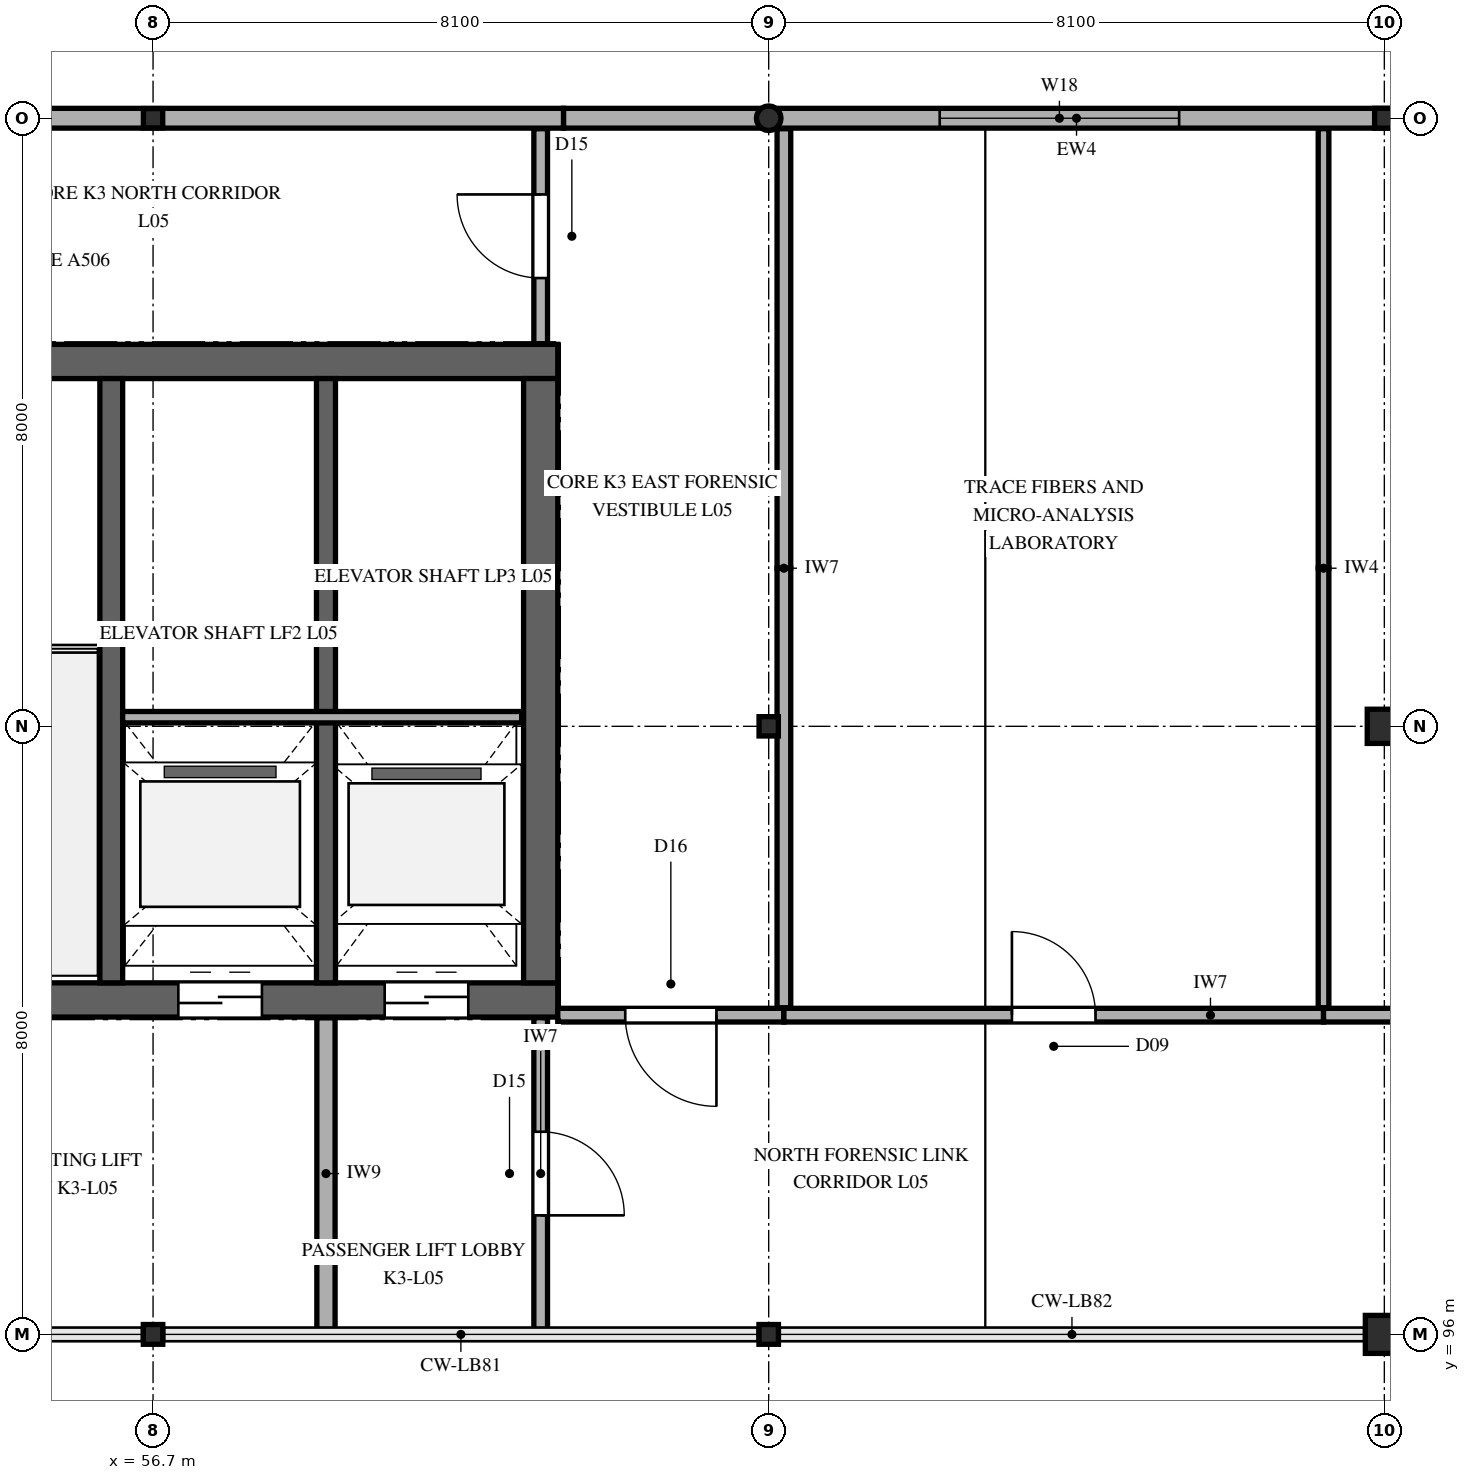
"""IFC4 building model, lengths in metres.
Left out: names, types, materials, properties, quantities, classifications, styles, units other than length and angle.
Written with IfcOpenShell. Run it as: python <this file> out.ifc"""

import sys

from ifc_helpers import new_model, si_unit, direction, frame, frame_2d, origin, origin_2d, place, context, subcontext, project, spatial, rectangle, hollow_rectangle, hollow_circle, i_section, extrude, element, fill, save


model = new_model("IFC4")
c1 = context("Model", 3, precision=1e-05, world=origin(), true_north=direction((0.0, 1.0)))
c2 = subcontext(c1, "Body", "Model", "MODEL_VIEW")
j1 = project(units=[si_unit("LENGTHUNIT", "METRE"), si_unit("PLANEANGLEUNIT", "RADIAN")], contexts=[c1])
p1 = place(None, origin())
s1 = spatial("IfcSite", under=j1, at=p1, CompositionType="ELEMENT")
p2 = place(p1, origin())
s2 = spatial("IfcBuilding", under=s1, at=p2, CompositionType="ELEMENT")
p3 = place(p2, frame((0.0, 0.0, 24.9)))
s3 = spatial("IfcBuildingStorey", under=s2, at=p3, CompositionType="ELEMENT", Elevation=24.9)
p4 = place(p3, frame((46.775, 100.4, 0.0), z_axis=(0.0, 0.0, 1.0), x_axis=(1.0, 0.0, 0.0)))
e1 = element("IfcWall", 1, at=p4, inside=s3, PredefinedType="SHEAR", context=c2, shape_type="SweptSolid", body=[
    extrude(rectangle(XDim=15.25, YDim=0.45, at=frame_2d((7.625, 0.0))), origin(), (0.0, 0.0, 1.0), 4.2),
])
p5 = place(p4, frame((0.975, 0.0, 0.0)))
e2 = element("IfcOpeningElement", 2, at=p5, cuts=e1, PredefinedType="OPENING", context=c2, shape_type="SweptSolid", body=[
    extrude(rectangle(XDim=1.15, YDim=2.25, at=frame_2d((0.575, 1.125))), frame((0.0, 0.235, 0.0), z_axis=(0.0, -1.0, 0.0), x_axis=(1.0, 0.0, 0.0)), (0.0, 0.0, 1.0), 0.47),
])
p6 = place(p4, frame((10.258, 0.0, 0.0)))
e3 = element("IfcOpeningElement", 3, at=p6, cuts=e1, PredefinedType="OPENING", context=c2, shape_type="SweptSolid", body=[
    extrude(rectangle(XDim=1.1, YDim=2.2, at=frame_2d((0.55, 1.1))), frame((0.0, 0.235, 0.0), z_axis=(0.0, -1.0, 0.0), x_axis=(1.0, 0.0, 0.0)), (0.0, 0.0, 1.0), 0.47),
])
p7 = place(p4, frame((12.972, 0.0, 0.0)))
e4 = element("IfcOpeningElement", 4, at=p7, cuts=e1, PredefinedType="OPENING", context=c2, shape_type="SweptSolid", body=[
    extrude(rectangle(XDim=1.1, YDim=2.2, at=frame_2d((0.55, 1.1))), frame((0.0, 0.235, 0.0), z_axis=(0.0, -1.0, 0.0), x_axis=(1.0, 0.0, 0.0)), (0.0, 0.0, 1.0), 0.47),
])
p8 = place(p3, frame((46.775, 108.8, 0.0), z_axis=(0.0, 0.0, 1.0), x_axis=(1.0, 0.0, 0.0)))
e5 = element("IfcWall", 5, at=p8, inside=s3, PredefinedType="SHEAR", context=c2, shape_type="SweptSolid", body=[
    extrude(rectangle(XDim=15.25, YDim=0.45, at=frame_2d((7.625, 0.0))), origin(), (0.0, 0.0, 1.0), 4.2),
])
p9 = place(p3, frame((61.8, 100.625, 0.0), z_axis=(0.0, 0.0, 1.0), x_axis=(0.0, 1.0, 0.0)))
e6 = element("IfcWall", 6, at=p9, inside=s3, PredefinedType="SHEAR", context=c2, shape_type="SweptSolid", body=[
    extrude(rectangle(XDim=7.95, YDim=0.45, at=frame_2d((3.975, 0.0))), origin(), (0.0, 0.0, 1.0), 4.2),
])
p10 = place(p3, frame((56.15, 100.625, 0.0), z_axis=(0.0, 0.0, 1.0), x_axis=(0.0, 1.0, 0.0)))
e7 = element("IfcWall", 7, at=p10, inside=s3, PredefinedType="SHEAR", context=c2, shape_type="SweptSolid", body=[
    extrude(rectangle(XDim=7.95, YDim=0.3, at=frame_2d((3.975, 0.0))), origin(), (0.0, 0.0, 1.0), 4.2),
])
p11 = place(p3, frame((58.975, 100.625, 0.0), z_axis=(0.0, 0.0, 1.0), x_axis=(0.0, 1.0, 0.0)))
e8 = element("IfcWall", 8, at=p11, inside=s3, PredefinedType="SHEAR", context=c2, shape_type="SweptSolid", body=[
    extrude(rectangle(XDim=7.95, YDim=0.25, at=frame_2d((3.975, 0.0))), origin(), (0.0, 0.0, 1.0), 4.2),
])
p12 = place(p3, frame((56.7, 96.0, 0.0), z_axis=(0.0, 0.0, 1.0), x_axis=(1.0, 0.0, 0.0)))
e9 = element("IfcColumn", 9, at=p12, inside=s3, PredefinedType="COLUMN", context=c2, shape_type="SweptSolid", body=[
    extrude(i_section(OverallWidth=0.256, OverallDepth=0.26, WebThickness=0.011, FlangeThickness=0.017, FilletRadius=0.013, at=origin_2d()), origin(), (0.0, 0.0, 1.0), 4.2),
])
p13 = place(p3, frame((56.7, 112.0, 0.0), z_axis=(0.0, 0.0, 1.0), x_axis=(1.0, 0.0, 0.0)))
e10 = element("IfcColumn", 10, at=p13, inside=s3, PredefinedType="COLUMN", context=c2, shape_type="SweptSolid", body=[
    extrude(hollow_rectangle(XDim=0.254, YDim=0.254, WallThickness=0.013, InnerFilletRadius=0.013, OuterFilletRadius=0.025, at=origin_2d()), origin(), (0.0, 0.0, 1.0), 4.2),
])
p14 = place(p3, frame((64.8, 96.0, 0.0), z_axis=(0.0, 0.0, 1.0), x_axis=(1.0, 0.0, 0.0)))
e11 = element("IfcColumn", 11, at=p14, inside=s3, PredefinedType="COLUMN", context=c2, shape_type="SweptSolid", body=[
    extrude(i_section(OverallWidth=0.256, OverallDepth=0.26, WebThickness=0.011, FlangeThickness=0.017, FilletRadius=0.013, at=origin_2d()), origin(), (0.0, 0.0, 1.0), 4.2),
])
p15 = place(p3, frame((64.8, 104.0, 0.0), z_axis=(0.0, 0.0, 1.0), x_axis=(1.0, 0.0, 0.0)))
e12 = element("IfcColumn", 12, at=p15, inside=s3, PredefinedType="COLUMN", context=c2, shape_type="SweptSolid", body=[
    extrude(hollow_rectangle(XDim=0.254, YDim=0.254, WallThickness=0.013, InnerFilletRadius=0.013, OuterFilletRadius=0.025, at=origin_2d()), origin(), (0.0, 0.0, 1.0), 4.2),
])
p16 = place(p3, frame((64.8, 112.0, 0.0), z_axis=(0.0, 0.0, 1.0), x_axis=(1.0, 0.0, 0.0)))
e13 = element("IfcColumn", 13, at=p16, inside=s3, PredefinedType="COLUMN", context=c2, shape_type="SweptSolid", body=[
    extrude(hollow_circle(Radius=0.162, WallThickness=0.013, at=origin_2d()), origin(), (0.0, 0.0, 1.0), 4.2),
])
p17 = place(p3, frame((72.9, 96.0, 0.0), z_axis=(0.0, 0.0, 1.0), x_axis=(1.0, 0.0, 0.0)))
e14 = element("IfcColumn", 14, at=p17, inside=s3, PredefinedType="COLUMN", context=c2, shape_type="SweptSolid", body=[
    extrude(rectangle(XDim=0.5, YDim=0.5, at=origin_2d()), origin(), (0.0, 0.0, 1.0), 4.2),
])
p18 = place(p3, frame((72.9, 104.0, 0.0), z_axis=(0.0, 0.0, 1.0), x_axis=(1.0, 0.0, 0.0)))
e15 = element("IfcColumn", 15, at=p18, inside=s3, PredefinedType="COLUMN", context=c2, shape_type="SweptSolid", body=[
    extrude(rectangle(XDim=0.45, YDim=0.45, at=origin_2d()), origin(), (0.0, 0.0, 1.0), 4.2),
])
p19 = place(p3, frame((72.9, 112.0, 0.0), z_axis=(0.0, 0.0, 1.0), x_axis=(1.0, 0.0, 0.0)))
e16 = element("IfcColumn", 16, at=p19, inside=s3, PredefinedType="COLUMN", context=c2, shape_type="SweptSolid", body=[
    extrude(i_section(OverallWidth=0.256, OverallDepth=0.26, WebThickness=0.011, FlangeThickness=0.017, FilletRadius=0.013, at=origin_2d()), origin(), (0.0, 0.0, 1.0), 4.2),
])
p20 = place(p3, frame((75.6, 112.0, 0.0), z_axis=(0.0, 0.0, 1.0), x_axis=(-1.0, 0.0, 0.0)))
e17 = element("IfcWall", 17, at=p20, inside=s3, PredefinedType="SOLIDWALL", context=c2, shape_type="SweptSolid", body=[
    extrude(rectangle(XDim=13.5, YDim=0.26, at=frame_2d((6.75, 0.0))), origin(), (0.0, 0.0, 1.0), 3.302),
])
p21 = place(p20, frame((5.4, 0.0, 0.95)))
e18 = element("IfcOpeningElement", 18, at=p21, cuts=e17, PredefinedType="OPENING", context=c2, shape_type="SweptSolid", body=[
    extrude(rectangle(XDim=3.15, YDim=1.6, at=frame_2d((1.575, 0.8))), frame((0.0, 0.14, 0.0), z_axis=(0.0, -1.0, 0.0), x_axis=(1.0, 0.0, 0.0)), (0.0, 0.0, 1.0), 0.28),
])
p22 = place(p3, frame((62.1, 112.0, 0.0), z_axis=(0.0, 0.0, 1.0), x_axis=(-1.0, 0.0, 0.0)))
e19 = element("IfcWall", 19, at=p22, inside=s3, PredefinedType="SOLIDWALL", context=c2, shape_type="SweptSolid", body=[
    extrude(rectangle(XDim=13.5, YDim=0.26, at=frame_2d((6.75, 0.0))), origin(), (0.0, 0.0, 1.0), 3.402),
])
p23 = place(p22, frame((7.2, 0.0, 0.95)))
e20 = element("IfcOpeningElement", 20, at=p23, cuts=e19, PredefinedType="OPENING", context=c2, shape_type="SweptSolid", body=[
    extrude(rectangle(XDim=3.6, YDim=1.8, at=frame_2d((1.8, 0.9))), frame((0.0, 0.14, 0.0), z_axis=(0.0, -1.0, 0.0), x_axis=(1.0, 0.0, 0.0)), (0.0, 0.0, 1.0), 0.28),
])
p24 = place(p3, frame((56.3, 104.12, 0.0), z_axis=(0.0, 0.0, 1.0), x_axis=(1.0, 0.0, 0.0)))
e21 = element("IfcWall", 21, at=p24, inside=s3, PredefinedType="PARTITIONING", context=c2, shape_type="SweptSolid", body=[
    extrude(rectangle(XDim=5.25, YDim=0.15, at=frame_2d((2.625, 0.0))), origin(), (0.0, 0.0, 1.0), 3.96),
])
p25 = place(p3, frame((62.025, 100.2, 0.0), z_axis=(0.0, 0.0, 1.0), x_axis=(1.0, 0.0, 0.0)))
e22 = element("IfcWall", 22, at=p25, inside=s3, PredefinedType="PARTITIONING", context=c2, shape_type="SweptSolid", body=[
    extrude(rectangle(XDim=2.975, YDim=0.18, at=frame_2d((1.488, 0.0))), origin(), (0.0, 0.0, 1.0), 3.96),
])
p26 = place(p25, frame((0.887, 0.0, 0.0)))
e23 = element("IfcOpeningElement", 23, at=p26, cuts=e22, PredefinedType="OPENING", context=c2, shape_type="SweptSolid", body=[
    extrude(rectangle(XDim=1.2, YDim=2.2, at=frame_2d((0.6, 1.1))), frame((0.0, 0.1, 0.0), z_axis=(0.0, -1.0, 0.0), x_axis=(1.0, 0.0, 0.0)), (0.0, 0.0, 1.0), 0.2),
])
p27 = place(p3, frame((65.0, 100.2, 0.0), z_axis=(0.0, 0.0, 1.0), x_axis=(1.0, 0.0, 0.0)))
e24 = element("IfcWall", 24, at=p27, inside=s3, PredefinedType="PARTITIONING", context=c2, shape_type="SweptSolid", body=[
    extrude(rectangle(XDim=7.1, YDim=0.18, at=frame_2d((3.55, 0.0))), origin(), (0.0, 0.0, 1.0), 3.96),
])
p28 = place(p27, frame((3.0, 0.0, 0.0)))
e25 = element("IfcOpeningElement", 25, at=p28, cuts=e24, PredefinedType="OPENING", context=c2, shape_type="SweptSolid", body=[
    extrude(rectangle(XDim=1.1, YDim=2.3, at=frame_2d((0.55, 1.15))), frame((0.0, 0.1, 0.0), z_axis=(0.0, -1.0, 0.0), x_axis=(1.0, 0.0, 0.0)), (0.0, 0.0, 1.0), 0.2),
])
p29 = place(p3, frame((72.1, 100.2, 0.0), z_axis=(0.0, 0.0, 1.0), x_axis=(1.0, 0.0, 0.0)))
e26 = element("IfcWall", 26, at=p29, inside=s3, PredefinedType="PARTITIONING", context=c2, shape_type="SweptSolid", body=[
    extrude(rectangle(XDim=7.1, YDim=0.18, at=frame_2d((3.55, 0.0))), origin(), (0.0, 0.0, 1.0), 3.96),
])
p30 = place(p29, frame((3.0, 0.0, 0.0)))
e27 = element("IfcOpeningElement", 27, at=p30, cuts=e26, PredefinedType="OPENING", context=c2, shape_type="SweptSolid", body=[
    extrude(rectangle(XDim=1.1, YDim=2.3, at=frame_2d((0.55, 1.15))), frame((0.0, 0.1, 0.0), z_axis=(0.0, -1.0, 0.0), x_axis=(1.0, 0.0, 0.0)), (0.0, 0.0, 1.0), 0.2),
])
p31 = place(p3, frame((58.975, 96.065, 0.0), z_axis=(0.0, 0.0, 1.0), x_axis=(0.0, 1.0, 0.0)))
e28 = element("IfcWall", 28, at=p31, inside=s3, PredefinedType="PARTITIONING", context=c2, shape_type="SweptSolid", body=[
    extrude(rectangle(XDim=4.102, YDim=0.24, at=frame_2d((2.051, 0.0))), origin(), (0.0, 0.0, 1.0), 3.96),
])
p32 = place(p3, frame((61.8, 96.065, 0.0), z_axis=(0.0, 0.0, 1.0), x_axis=(0.0, 1.0, 0.0)))
e29 = element("IfcWall", 29, at=p32, inside=s3, PredefinedType="PARTITIONING", context=c2, shape_type="SweptSolid", body=[
    extrude(rectangle(XDim=4.102, YDim=0.18, at=frame_2d((2.051, 0.0))), origin(), (0.0, 0.0, 1.0), 3.96),
])
p33 = place(p32, frame((1.501, 0.0, 0.0)))
e30 = element("IfcOpeningElement", 30, at=p33, cuts=e29, PredefinedType="OPENING", context=c2, shape_type="SweptSolid", body=[
    extrude(rectangle(XDim=1.1, YDim=2.2, at=frame_2d((0.55, 1.1))), frame((0.0, 0.1, 0.0), z_axis=(0.0, -1.0, 0.0), x_axis=(1.0, 0.0, 0.0)), (0.0, 0.0, 1.0), 0.2),
])
p34 = place(p3, frame((61.8, 109.033, 0.0), z_axis=(0.0, 0.0, 1.0), x_axis=(0.0, 1.0, 0.0)))
e31 = element("IfcWall", 31, at=p34, inside=s3, PredefinedType="PARTITIONING", context=c2, shape_type="SweptSolid", body=[
    extrude(rectangle(XDim=2.829, YDim=0.18, at=frame_2d((1.415, 0.0))), origin(), (0.0, 0.0, 1.0), 3.96),
])
p35 = place(p34, frame((0.865, 0.0, 0.0)))
e32 = element("IfcOpeningElement", 32, at=p35, cuts=e31, PredefinedType="OPENING", context=c2, shape_type="SweptSolid", body=[
    extrude(rectangle(XDim=1.1, YDim=2.2, at=frame_2d((0.55, 1.1))), frame((0.0, 0.1, 0.0), z_axis=(0.0, -1.0, 0.0), x_axis=(1.0, 0.0, 0.0)), (0.0, 0.0, 1.0), 0.2),
])
for number, where, z_axis, x_axis in (
    (33, (65.0, 100.298, 0.0), (0.0, 0.0, 1.0), (0.0, 1.0, 0.0)),
    (34, (65.0, 106.08, 0.0), (0.0, 0.0, 1.0), (0.0, 1.0, 0.0)),
):
    element("IfcWall", number, at=place(p3, frame(where, z_axis=z_axis, x_axis=x_axis)), inside=s3, PredefinedType="PARTITIONING", context=c2, shape_type="SweptSolid", body=[
        extrude(rectangle(XDim=5.782, YDim=0.18, at=frame_2d((2.891, 0.0))), origin(), (0.0, 0.0, 1.0), 3.452),
    ])
for number, where, z_axis, x_axis in (
    (35, (72.1, 100.298, 0.0), (0.0, 0.0, 1.0), (0.0, 1.0, 0.0)),
    (36, (72.1, 106.08, 0.0), (0.0, 0.0, 1.0), (0.0, 1.0, 0.0)),
):
    element("IfcWall", number, at=place(p3, frame(where, z_axis=z_axis, x_axis=x_axis)), inside=s3, PredefinedType="PARTITIONING", context=c2, shape_type="SweptSolid", body=[
        extrude(rectangle(XDim=5.782, YDim=0.14, at=frame_2d((2.891, 0.0))), origin(), (0.0, 0.0, 1.0), 3.96),
    ])
p36 = place(p21, origin())
e37 = element("IfcWindow", 37, at=p36, inside=s3, PartitioningType="TRIPLE_PANEL_VERTICAL", PredefinedType="WINDOW", context=c2, shape_type="SweptSolid", body=[
    extrude(rectangle(XDim=3.15, YDim=1.6, at=frame_2d((1.575, 0.8))), frame((0.0, 0.03, 0.0), z_axis=(0.0, -1.0, 0.0), x_axis=(1.0, 0.0, 0.0)), (0.0, 0.0, 1.0), 0.06),
])
fill(e18, e37)
p37 = place(p6, frame((1.1, 0.0, 0.0), z_axis=(0.0, 0.0, 1.0), x_axis=(-1.0, 0.0, 0.0)))
e38 = element("IfcDoor", 38, at=p37, inside=s3, OperationType="DOUBLE_DOOR_SLIDING", PredefinedType="DOOR", context=c2, shape_type="SweptSolid", body=[
    extrude(rectangle(XDim=1.1, YDim=2.2, at=frame_2d((0.55, 1.1))), frame((0.0, 0.025, 0.0), z_axis=(0.0, -1.0, 0.0), x_axis=(1.0, 0.0, 0.0)), (0.0, 0.0, 1.0), 0.05),
])
fill(e3, e38)
p38 = place(p7, frame((1.1, 0.0, 0.0), z_axis=(0.0, 0.0, 1.0), x_axis=(-1.0, 0.0, 0.0)))
e39 = element("IfcDoor", 39, at=p38, inside=s3, OperationType="DOUBLE_DOOR_SLIDING", PredefinedType="DOOR", context=c2, shape_type="SweptSolid", body=[
    extrude(rectangle(XDim=1.1, YDim=2.2, at=frame_2d((0.55, 1.1))), frame((0.0, 0.025, 0.0), z_axis=(0.0, -1.0, 0.0), x_axis=(1.0, 0.0, 0.0)), (0.0, 0.0, 1.0), 0.05),
])
fill(e4, e39)
p39 = place(p26, frame((1.2, 0.0, 0.0), z_axis=(0.0, 0.0, 1.0), x_axis=(-1.0, 0.0, 0.0)))
e40 = element("IfcDoor", 40, at=p39, inside=s3, OperationType="SINGLE_SWING_RIGHT", PredefinedType="DOOR", context=c2, shape_type="SweptSolid", body=[
    extrude(rectangle(XDim=1.2, YDim=2.2, at=frame_2d((0.6, 1.1))), frame((0.0, 0.025, 0.0), z_axis=(0.0, -1.0, 0.0), x_axis=(1.0, 0.0, 0.0)), (0.0, 0.0, 1.0), 0.05),
])
fill(e23, e40)
p40 = place(p28, origin())
e41 = element("IfcDoor", 41, at=p40, inside=s3, OperationType="SINGLE_SWING_LEFT", PredefinedType="DOOR", context=c2, shape_type="SweptSolid", body=[
    extrude(rectangle(XDim=1.1, YDim=2.3, at=frame_2d((0.55, 1.15))), frame((0.0, 0.025, 0.0), z_axis=(0.0, -1.0, 0.0), x_axis=(1.0, 0.0, 0.0)), (0.0, 0.0, 1.0), 0.05),
])
fill(e25, e41)
p41 = place(p33, frame((1.1, 0.0, 0.0), z_axis=(0.0, 0.0, 1.0), x_axis=(-1.0, 0.0, 0.0)))
e42 = element("IfcDoor", 42, at=p41, inside=s3, OperationType="SINGLE_SWING_LEFT", PredefinedType="DOOR", context=c2, shape_type="SweptSolid", body=[
    extrude(rectangle(XDim=1.1, YDim=2.2, at=frame_2d((0.55, 1.1))), frame((0.0, 0.025, 0.0), z_axis=(0.0, -1.0, 0.0), x_axis=(1.0, 0.0, 0.0)), (0.0, 0.0, 1.0), 0.05),
])
fill(e30, e42)
p42 = place(p35, origin())
e43 = element("IfcDoor", 43, at=p42, inside=s3, OperationType="SINGLE_SWING_RIGHT", PredefinedType="DOOR", context=c2, shape_type="SweptSolid", body=[
    extrude(rectangle(XDim=1.1, YDim=2.2, at=frame_2d((0.55, 1.1))), frame((0.0, 0.025, 0.0), z_axis=(0.0, -1.0, 0.0), x_axis=(1.0, 0.0, 0.0)), (0.0, 0.0, 1.0), 0.05),
])
fill(e32, e43)
save(model, sys.argv[1])
